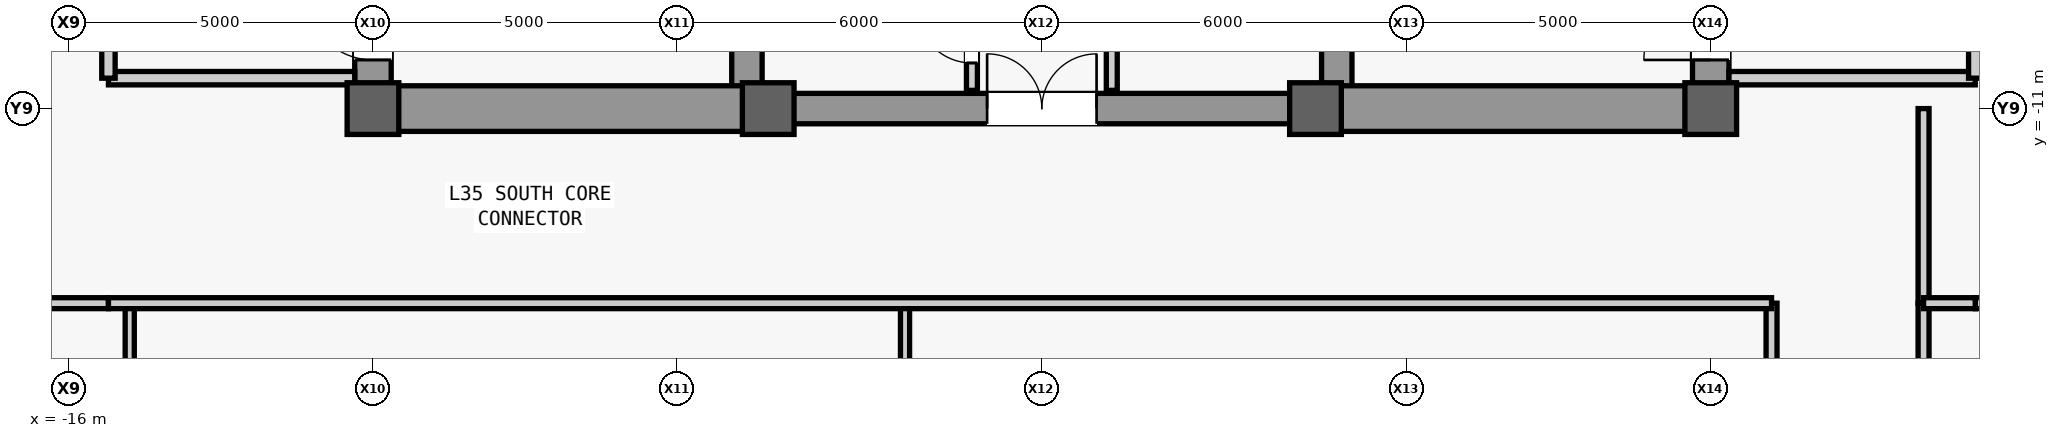
"""IFC4 building model, lengths in metres.
Left out: names, types, materials, properties, quantities, classifications, styles, units other than length and angle.
Written with IfcOpenShell. Run it as: python <this file> out.ifc"""

import sys

from ifc_helpers import new_model, si_unit, direction, frame, frame_2d, origin, origin_2d, place, context, subcontext, project, spatial, rectangle, extrude, source, transform, mapped, element, fill, save


model = new_model("IFC4")
c1 = context("Model", 3, precision=1e-05, world=origin(), true_north=direction((0.0, 1.0)))
c2 = subcontext(c1, "Body", "Model", "MODEL_VIEW")
j1 = project(units=[si_unit("LENGTHUNIT", "METRE"), si_unit("PLANEANGLEUNIT", "RADIAN")], contexts=[c1])
p1 = place(None, origin())
s1 = spatial("IfcSite", under=j1, at=p1, CompositionType="ELEMENT")
p2 = place(p1, origin())
s2 = spatial("IfcBuilding", under=s1, at=p2, CompositionType="ELEMENT")
p3 = place(p2, frame((0.0, 0.0, 155.1)))
s3 = spatial("IfcBuildingStorey", under=s2, at=p3, CompositionType="ELEMENT", Elevation=155.1)
m1 = source(origin(), c2, "Body", "SweptSolid", [
    extrude(rectangle(XDim=22.0, YDim=0.6, at=frame_2d((11.0, 0.0))), origin(), (0.0, 0.0, 1.0), 3.78),
])
p4 = place(p3, frame((-11.0, -11.0, 0.0), z_axis=(0.0, 0.0, 1.0), x_axis=(0.0, 1.0, 0.0)))
e1 = element("IfcWall", 1, at=p4, inside=s3, PredefinedType="SHEAR", context=c2, shape_type="MappedRepresentation", body=[
    mapped(m1, transform((0.0, 0.0, 0.0), scale=1.0)),
])
m2 = source(origin(), c2, "Body", "SweptSolid", [
    extrude(rectangle(XDim=1.1, YDim=2.2, at=frame_2d((0.55, 1.1))), frame((0.0, 0.31, 0.0), z_axis=(0.0, -1.0, 0.0), x_axis=(1.0, 0.0, 0.0)), (0.0, 0.0, 1.0), 0.62),
])
p5 = place(p4, frame((0.8, 0.0, 0.0)))
e2 = element("IfcOpeningElement", 2, at=p5, cuts=e1, PredefinedType="OPENING", context=c2, shape_type="MappedRepresentation", body=[
    mapped(m2, transform((0.0, 0.0, 0.0), scale=1.0)),
])
p6 = place(p4, frame((12.5, 0.0, 0.0)))
e3 = element("IfcOpeningElement", 3, at=p6, cuts=e1, PredefinedType="OPENING", context=c2, shape_type="MappedRepresentation", body=[
    mapped(m2, transform((0.0, 0.0, 0.0), scale=1.0)),
])
m3 = source(origin(), c2, "Body", "SweptSolid", [
    extrude(rectangle(XDim=0.9, YDim=2.15, at=frame_2d((0.45, 1.075))), frame((0.0, 0.31, 0.0), z_axis=(0.0, -1.0, 0.0), x_axis=(1.0, 0.0, 0.0)), (0.0, 0.0, 1.0), 0.62),
])
p7 = place(p4, frame((6.2, 0.0, 0.0)))
e4 = element("IfcOpeningElement", 4, at=p7, cuts=e1, PredefinedType="OPENING", context=c2, shape_type="MappedRepresentation", body=[
    mapped(m3, transform((0.0, 0.0, 0.0), scale=1.0)),
])
p8 = place(p4, frame((8.525, 0.0, 0.0)))
e5 = element("IfcOpeningElement", 5, at=p8, cuts=e1, PredefinedType="OPENING", context=c2, shape_type="MappedRepresentation", body=[
    mapped(m3, transform((0.0, 0.0, 0.0), scale=1.0)),
])
m4 = source(origin(), c2, "Body", "SweptSolid", [
    extrude(rectangle(XDim=1.3, YDim=2.3, at=frame_2d((0.65, 1.15))), frame((0.0, 0.31, 0.0), z_axis=(0.0, -1.0, 0.0), x_axis=(1.0, 0.0, 0.0)), (0.0, 0.0, 1.0), 0.62),
])
p9 = place(p4, frame((2.7, 0.0, 0.0)))
e6 = element("IfcOpeningElement", 6, at=p9, cuts=e1, PredefinedType="OPENING", context=c2, shape_type="MappedRepresentation", body=[
    mapped(m4, transform((0.0, 0.0, 0.0), scale=1.0)),
])
p10 = place(p3, frame((11.0, -11.0, 0.0), z_axis=(0.0, 0.0, 1.0), x_axis=(0.0, 1.0, 0.0)))
e7 = element("IfcWall", 7, at=p10, inside=s3, PredefinedType="SHEAR", context=c2, shape_type="MappedRepresentation", body=[
    mapped(m1, transform((0.0, 0.0, 0.0), scale=1.0)),
])
p11 = place(p10, frame((0.8, 0.0, 0.0)))
e8 = element("IfcOpeningElement", 8, at=p11, cuts=e7, PredefinedType="OPENING", context=c2, shape_type="MappedRepresentation", body=[
    mapped(m2, transform((0.0, 0.0, 0.0), scale=1.0)),
])
p12 = place(p10, frame((6.2, 0.0, 0.0)))
e9 = element("IfcOpeningElement", 9, at=p12, cuts=e7, PredefinedType="OPENING", context=c2, shape_type="MappedRepresentation", body=[
    mapped(m3, transform((0.0, 0.0, 0.0), scale=1.0)),
])
p13 = place(p10, frame((8.525, 0.0, 0.0)))
e10 = element("IfcOpeningElement", 10, at=p13, cuts=e7, PredefinedType="OPENING", context=c2, shape_type="MappedRepresentation", body=[
    mapped(m3, transform((0.0, 0.0, 0.0), scale=1.0)),
])
p14 = place(p10, frame((2.7, 0.0, 0.0)))
e11 = element("IfcOpeningElement", 11, at=p14, cuts=e7, PredefinedType="OPENING", context=c2, shape_type="MappedRepresentation", body=[
    mapped(m4, transform((0.0, 0.0, 0.0), scale=1.0)),
])
p15 = place(p10, frame((13.35, 0.0, 0.0)))
e12 = element("IfcOpeningElement", 12, at=p15, cuts=e7, PredefinedType="OPENING", context=c2, shape_type="MappedRepresentation", body=[
    mapped(m4, transform((0.0, 0.0, 0.0), scale=1.0)),
])
m5 = source(origin(), c2, "Body", "SweptSolid", [
    extrude(rectangle(XDim=21.4, YDim=0.5, at=frame_2d((10.7, 0.0))), origin(), (0.0, 0.0, 1.0), 3.78),
])
for number, where, z_axis, x_axis in (
    (13, (-4.85, -10.7, 0.0), (0.0, 0.0, 1.0), (0.0, 1.0, 0.0)),
    (14, (4.85, -10.7, 0.0), (0.0, 0.0, 1.0), (0.0, 1.0, 0.0)),
):
    element("IfcWall", number, at=place(p3, frame(where, z_axis=z_axis, x_axis=x_axis)), inside=s3, PredefinedType="SHEAR", context=c2, shape_type="MappedRepresentation", body=[
        mapped(m5, transform((0.0, 0.0, 0.0), scale=1.0)),
    ])
m6 = source(origin(), c2, "Body", "SweptSolid", [
    extrude(rectangle(XDim=5.85, YDim=0.75, at=frame_2d((2.925, 0.0))), origin(), (0.0, 0.0, 1.0), 3.78),
])
for number, where, z_axis, x_axis in (
    (15, (-10.7, -11.0, 0.0), (0.0, 0.0, 1.0), (1.0, 0.0, 0.0)),
    (16, (4.85, -11.0, 0.0), (0.0, 0.0, 1.0), (1.0, 0.0, 0.0)),
):
    element("IfcWall", number, at=place(p3, frame(where, z_axis=z_axis, x_axis=x_axis)), inside=s3, PredefinedType="SHEAR", context=c2, shape_type="MappedRepresentation", body=[
        mapped(m6, transform((0.0, 0.0, 0.0), scale=1.0)),
    ])
m7 = source(origin(), c2, "Body", "SweptSolid", [
    extrude(rectangle(XDim=9.2, YDim=0.5, at=frame_2d((4.6, 0.0))), origin(), (0.0, 0.0, 1.0), 3.78),
])
p16 = place(p3, frame((-4.6, -11.0, 0.0), z_axis=(0.0, 0.0, 1.0), x_axis=(1.0, 0.0, 0.0)))
e17 = element("IfcWall", 17, at=p16, inside=s3, PredefinedType="SHEAR", context=c2, shape_type="MappedRepresentation", body=[
    mapped(m7, transform((0.0, 0.0, 0.0), scale=1.0)),
])
m8 = source(origin(), c2, "Body", "SweptSolid", [
    extrude(rectangle(XDim=1.8, YDim=2.25, at=frame_2d((0.9, 1.125))), frame((0.0, 0.26, 0.0), z_axis=(0.0, -1.0, 0.0), x_axis=(1.0, 0.0, 0.0)), (0.0, 0.0, 1.0), 0.52),
])
p17 = place(p16, frame((3.7, 0.0, 0.0)))
e18 = element("IfcOpeningElement", 18, at=p17, cuts=e17, PredefinedType="OPENING", context=c2, shape_type="MappedRepresentation", body=[
    mapped(m8, transform((0.0, 0.0, 0.0), scale=1.0)),
])
m9 = source(origin(), c2, "Body", "SweptSolid", [
    extrude(rectangle(XDim=0.85, YDim=0.85, at=origin_2d()), origin(), (0.0, 0.0, 1.0), 4.0),
])
for number, where, z_axis, x_axis in (
    (19, (-11.0, -11.0, 0.0), (0.0, 0.0, 1.0), (1.0, 0.0, 0.0)),
    (20, (-4.5, -11.0, 0.0), (0.0, 0.0, 1.0), (1.0, 0.0, 0.0)),
    (21, (4.5, -11.0, 0.0), (0.0, 0.0, 1.0), (1.0, 0.0, 0.0)),
    (22, (11.0, -11.0, 0.0), (0.0, 0.0, 1.0), (1.0, 0.0, 0.0)),
):
    element("IfcColumn", number, at=place(p3, frame(where, z_axis=z_axis, x_axis=x_axis)), inside=s3, PredefinedType="COLUMN", context=c2, shape_type="MappedRepresentation", body=[
        mapped(m9, transform((0.0, 0.0, 0.0), scale=1.0)),
    ])
m10 = source(origin(), c2, "Body", "SweptSolid", [
    extrude(rectangle(XDim=4.05, YDim=0.22, at=frame_2d((2.025, 0.0))), origin(), (0.0, 0.0, 1.0), 3.78),
])
p18 = place(p3, frame((-15.35, -10.5, 0.0), z_axis=(0.0, 0.0, 1.0), x_axis=(1.0, 0.0, 0.0)))
e23 = element("IfcWall", 23, at=p18, inside=s3, PredefinedType="PARTITIONING", context=c2, shape_type="MappedRepresentation", body=[
    mapped(m10, transform((0.0, 0.0, 0.0), scale=1.0)),
])
m11 = source(origin(), c2, "Body", "SweptSolid", [
    extrude(rectangle(XDim=4.4, YDim=0.22, at=frame_2d((2.2, 0.0))), origin(), (0.0, 0.0, 1.0), 3.78),
])
p19 = place(p3, frame((-15.35, -10.5, 0.0), z_axis=(0.0, 0.0, 1.0), x_axis=(0.0, 1.0, 0.0)))
e24 = element("IfcWall", 24, at=p19, inside=s3, PredefinedType="PARTITIONING", context=c2, shape_type="MappedRepresentation", body=[
    mapped(m11, transform((0.0, 0.0, 0.0), scale=1.0)),
])
m12 = source(origin(), c2, "Body", "SweptSolid", [
    extrude(rectangle(XDim=1.2, YDim=2.2, at=frame_2d((0.6, 1.1))), frame((0.0, 0.12, 0.0), z_axis=(0.0, -1.0, 0.0), x_axis=(1.0, 0.0, 0.0)), (0.0, 0.0, 1.0), 0.24),
])
p20 = place(p19, frame((1.6, 0.0, 0.0)))
e25 = element("IfcOpeningElement", 25, at=p20, cuts=e24, PredefinedType="OPENING", context=c2, shape_type="MappedRepresentation", body=[
    mapped(m12, transform((0.0, 0.0, 0.0), scale=1.0)),
])
p21 = place(p3, frame((11.3, -10.5, 0.0), z_axis=(0.0, 0.0, 1.0), x_axis=(1.0, 0.0, 0.0)))
e26 = element("IfcWall", 26, at=p21, inside=s3, PredefinedType="PARTITIONING", context=c2, shape_type="MappedRepresentation", body=[
    mapped(m10, transform((0.0, 0.0, 0.0), scale=1.0)),
])
p22 = place(p3, frame((15.35, -10.5, 0.0), z_axis=(0.0, 0.0, 1.0), x_axis=(0.0, 1.0, 0.0)))
e27 = element("IfcWall", 27, at=p22, inside=s3, PredefinedType="PARTITIONING", context=c2, shape_type="MappedRepresentation", body=[
    mapped(m11, transform((0.0, 0.0, 0.0), scale=1.0)),
])
p23 = place(p22, frame((1.6, 0.0, 0.0)))
e28 = element("IfcOpeningElement", 28, at=p23, cuts=e27, PredefinedType="OPENING", context=c2, shape_type="MappedRepresentation", body=[
    mapped(m12, transform((0.0, 0.0, 0.0), scale=1.0)),
])
m13 = source(origin(), c2, "Body", "SweptSolid", [
    extrude(rectangle(XDim=5.4, YDim=0.18, at=frame_2d((2.7, 0.0))), origin(), (0.0, 0.0, 1.0), 3.78),
])
p24 = place(p3, frame((-1.15, -10.7, 0.0), z_axis=(0.0, 0.0, 1.0), x_axis=(0.0, 1.0, 0.0)))
e29 = element("IfcWall", 29, at=p24, inside=s3, PredefinedType="PARTITIONING", context=c2, shape_type="MappedRepresentation", body=[
    mapped(m13, transform((0.0, 0.0, 0.0), scale=1.0)),
])
m14 = source(origin(), c2, "Body", "SweptSolid", [
    extrude(rectangle(XDim=0.9, YDim=2.15, at=frame_2d((0.45, 1.075))), frame((0.0, 0.1, 0.0), z_axis=(0.0, -1.0, 0.0), x_axis=(1.0, 0.0, 0.0)), (0.0, 0.0, 1.0), 0.2),
])
p25 = place(p24, frame((0.45, 0.0, 0.0)))
e30 = element("IfcOpeningElement", 30, at=p25, cuts=e29, PredefinedType="OPENING", context=c2, shape_type="MappedRepresentation", body=[
    mapped(m14, transform((0.0, 0.0, 0.0), scale=1.0)),
])
p26 = place(p24, frame((2.25, 0.0, 0.0)))
e31 = element("IfcOpeningElement", 31, at=p26, cuts=e29, PredefinedType="OPENING", context=c2, shape_type="MappedRepresentation", body=[
    mapped(m14, transform((0.0, 0.0, 0.0), scale=1.0)),
])
p27 = place(p24, frame((4.05, 0.0, 0.0)))
e32 = element("IfcOpeningElement", 32, at=p27, cuts=e29, PredefinedType="OPENING", context=c2, shape_type="MappedRepresentation", body=[
    mapped(m14, transform((0.0, 0.0, 0.0), scale=1.0)),
])
p28 = place(p3, frame((1.15, -10.7, 0.0), z_axis=(0.0, 0.0, 1.0), x_axis=(0.0, 1.0, 0.0)))
e33 = element("IfcWall", 33, at=p28, inside=s3, PredefinedType="PARTITIONING", context=c2, shape_type="MappedRepresentation", body=[
    mapped(m13, transform((0.0, 0.0, 0.0), scale=1.0)),
])
p29 = place(p28, frame((0.95, 0.0, 0.0)))
e34 = element("IfcOpeningElement", 34, at=p29, cuts=e33, PredefinedType="OPENING", context=c2, shape_type="MappedRepresentation", body=[
    mapped(m14, transform((0.0, 0.0, 0.0), scale=1.0)),
])
p30 = place(p28, frame((3.65, 0.0, 0.0)))
e35 = element("IfcOpeningElement", 35, at=p30, cuts=e33, PredefinedType="OPENING", context=c2, shape_type="MappedRepresentation", body=[
    mapped(m14, transform((0.0, 0.0, 0.0), scale=1.0)),
])
m15 = source(origin(), c2, "Body", "SweptSolid", [
    extrude(rectangle(XDim=2.45, YDim=0.18, at=frame_2d((1.225, 0.0))), origin(), (0.0, 0.0, 1.0), 3.78),
])
for number, where, z_axis, x_axis in (
    (36, (15.35, -14.2, 0.0), (0.0, 0.0, 1.0), (1.0, 0.0, 0.0)),
    (37, (-17.8, -14.2, 0.0), (0.0, 0.0, 1.0), (1.0, 0.0, 0.0)),
):
    element("IfcWall", number, at=place(p3, frame(where, z_axis=z_axis, x_axis=x_axis)), inside=s3, PredefinedType="PARTITIONING", context=c2, shape_type="MappedRepresentation", body=[
        mapped(m15, transform((0.0, 0.0, 0.0), scale=1.0)),
    ])
m16 = source(origin(), c2, "Body", "SweptSolid", [
    extrude(rectangle(XDim=3.2, YDim=0.18, at=frame_2d((1.6, 0.0))), origin(), (0.0, 0.0, 1.0), 3.78),
])
p31 = place(p3, frame((14.5, -14.2, 0.0), z_axis=(0.0, 0.0, 1.0), x_axis=(0.0, 1.0, 0.0)))
e38 = element("IfcWall", 38, at=p31, inside=s3, PredefinedType="PARTITIONING", context=c2, shape_type="MappedRepresentation", body=[
    mapped(m16, transform((0.0, 0.0, 0.0), scale=1.0)),
])
m17 = source(origin(), c2, "Body", "SweptSolid", [
    extrude(rectangle(XDim=15.8, YDim=0.15, at=frame_2d((7.9, 0.0))), origin(), (0.0, 0.0, 1.0), 3.78),
])
p32 = place(p3, frame((-15.0, -30.0, 0.0), z_axis=(0.0, 0.0, 1.0), x_axis=(0.0, 1.0, 0.0)))
e39 = element("IfcWall", 39, at=p32, inside=s3, PredefinedType="PARTITIONING", context=c2, shape_type="MappedRepresentation", body=[
    mapped(m17, transform((0.0, 0.0, 0.0), scale=1.0)),
])
m18 = source(origin(), c2, "Body", "SweptSolid", [
    extrude(rectangle(XDim=0.95, YDim=2.15, at=frame_2d((0.475, 1.075))), frame((0.0, 0.085, 0.0), z_axis=(0.0, -1.0, 0.0), x_axis=(1.0, 0.0, 0.0)), (0.0, 0.0, 1.0), 0.17),
])
p33 = place(p32, frame((11.375, 0.0, 0.0)))
e40 = element("IfcOpeningElement", 40, at=p33, cuts=e39, PredefinedType="OPENING", context=c2, shape_type="MappedRepresentation", body=[
    mapped(m18, transform((0.0, 0.0, 0.0), scale=1.0)),
])
p34 = place(p3, frame((-2.25, -30.0, 0.0), z_axis=(0.0, 0.0, 1.0), x_axis=(0.0, 1.0, 0.0)))
e41 = element("IfcWall", 41, at=p34, inside=s3, PredefinedType="PARTITIONING", context=c2, shape_type="MappedRepresentation", body=[
    mapped(m17, transform((0.0, 0.0, 0.0), scale=1.0)),
])
p35 = place(p34, frame((11.375, 0.0, 0.0)))
e42 = element("IfcOpeningElement", 42, at=p35, cuts=e41, PredefinedType="OPENING", context=c2, shape_type="MappedRepresentation", body=[
    mapped(m18, transform((0.0, 0.0, 0.0), scale=1.0)),
])
m19 = source(origin(), c2, "Body", "SweptSolid", [
    extrude(rectangle(XDim=15.8, YDim=0.18, at=frame_2d((7.9, 0.0))), origin(), (0.0, 0.0, 1.0), 3.78),
])
p36 = place(p3, frame((12.0, -30.0, 0.0), z_axis=(0.0, 0.0, 1.0), x_axis=(0.0, 1.0, 0.0)))
e43 = element("IfcWall", 43, at=p36, inside=s3, PredefinedType="PARTITIONING", context=c2, shape_type="MappedRepresentation", body=[
    mapped(m19, transform((0.0, 0.0, 0.0), scale=1.0)),
])
m20 = source(origin(), c2, "Body", "SweptSolid", [
    extrude(rectangle(XDim=1.05, YDim=2.2, at=frame_2d((0.525, 1.1))), frame((0.0, 0.1, 0.0), z_axis=(0.0, -1.0, 0.0), x_axis=(1.0, 0.0, 0.0)), (0.0, 0.0, 1.0), 0.2),
])
p37 = place(p36, frame((3.425, 0.0, 0.0)))
e44 = element("IfcOpeningElement", 44, at=p37, cuts=e43, PredefinedType="OPENING", context=c2, shape_type="MappedRepresentation", body=[
    mapped(m20, transform((0.0, 0.0, 0.0), scale=1.0)),
])
m21 = source(origin(), c2, "Body", "SweptSolid", [
    extrude(rectangle(XDim=27.35, YDim=0.18, at=frame_2d((13.675, 0.0))), origin(), (0.0, 0.0, 1.0), 3.78),
])
p38 = place(p3, frame((-15.35, -14.2, 0.0), z_axis=(0.0, 0.0, 1.0), x_axis=(1.0, 0.0, 0.0)))
e45 = element("IfcWall", 45, at=p38, inside=s3, PredefinedType="PARTITIONING", context=c2, shape_type="MappedRepresentation", body=[
    mapped(m21, transform((0.0, 0.0, 0.0), scale=1.0)),
])
p39 = place(p3, frame((14.5, -30.0, 0.0), z_axis=(0.0, 0.0, 1.0), x_axis=(0.0, 1.0, 0.0)))
e46 = element("IfcWall", 46, at=p39, inside=s3, PredefinedType="PARTITIONING", context=c2, shape_type="MappedRepresentation", body=[
    mapped(m19, transform((0.0, 0.0, 0.0), scale=1.0)),
])
p40 = place(p39, frame((3.425, 0.0, 0.0)))
e47 = element("IfcOpeningElement", 47, at=p40, cuts=e46, PredefinedType="OPENING", context=c2, shape_type="MappedRepresentation", body=[
    mapped(m20, transform((0.0, 0.0, 0.0), scale=1.0)),
])
m22 = source(origin(), c2, "Body", "SweptSolid", [
    extrude(rectangle(XDim=0.85, YDim=0.18, at=frame_2d((0.425, 0.0))), origin(), (0.0, 0.0, 1.0), 3.78),
])
p41 = place(p3, frame((14.5, -14.2, 0.0), z_axis=(0.0, 0.0, 1.0), x_axis=(1.0, 0.0, 0.0)))
e48 = element("IfcWall", 48, at=p41, inside=s3, PredefinedType="PARTITIONING", context=c2, shape_type="MappedRepresentation", body=[
    mapped(m22, transform((0.0, 0.0, 0.0), scale=1.0)),
])
m23 = source(origin(), c2, "Body", "SweptSolid", [
    extrude(rectangle(XDim=1.1, YDim=2.2, at=frame_2d((0.55, 1.1))), frame((0.0, 0.025, 0.0), z_axis=(0.0, -1.0, 0.0), x_axis=(1.0, 0.0, 0.0)), (0.0, 0.0, 1.0), 0.05),
])
p42 = place(p5, origin())
e49 = element("IfcDoor", 49, at=p42, inside=s3, OperationType="SINGLE_SWING_RIGHT", PredefinedType="DOOR", context=c2, shape_type="MappedRepresentation", body=[
    mapped(m23, transform((0.0, 0.0, 0.0), scale=1.0)),
])
fill(e2, e49)
p43 = place(p11, origin())
e50 = element("IfcDoor", 50, at=p43, inside=s3, OperationType="SINGLE_SWING_LEFT", PredefinedType="DOOR", context=c2, shape_type="MappedRepresentation", body=[
    mapped(m23, transform((0.0, 0.0, 0.0), scale=1.0)),
])
fill(e8, e50)
m24 = source(origin(), c2, "Body", "SweptSolid", [
    extrude(rectangle(XDim=0.9, YDim=2.15, at=frame_2d((0.45, 1.075))), frame((0.0, 0.025, 0.0), z_axis=(0.0, -1.0, 0.0), x_axis=(1.0, 0.0, 0.0)), (0.0, 0.0, 1.0), 0.05),
])
p44 = place(p25, origin())
e51 = element("IfcDoor", 51, at=p44, inside=s3, OperationType="SINGLE_SWING_RIGHT", PredefinedType="DOOR", context=c2, shape_type="MappedRepresentation", body=[
    mapped(m24, transform((0.0, 0.0, 0.0), scale=1.0)),
])
fill(e30, e51)
m25 = source(origin(), c2, "Body", "SweptSolid", [
    extrude(rectangle(XDim=1.8, YDim=2.25, at=frame_2d((0.9, 1.125))), frame((0.0, 0.025, 0.0), z_axis=(0.0, -1.0, 0.0), x_axis=(1.0, 0.0, 0.0)), (0.0, 0.0, 1.0), 0.05),
])
p45 = place(p17, origin())
e52 = element("IfcDoor", 52, at=p45, inside=s3, OperationType="SINGLE_SWING_LEFT", PredefinedType="DOOR", context=c2, shape_type="MappedRepresentation", body=[
    mapped(m25, transform((0.0, 0.0, 0.0), scale=1.0)),
])
fill(e18, e52)
save(model, sys.argv[1])
